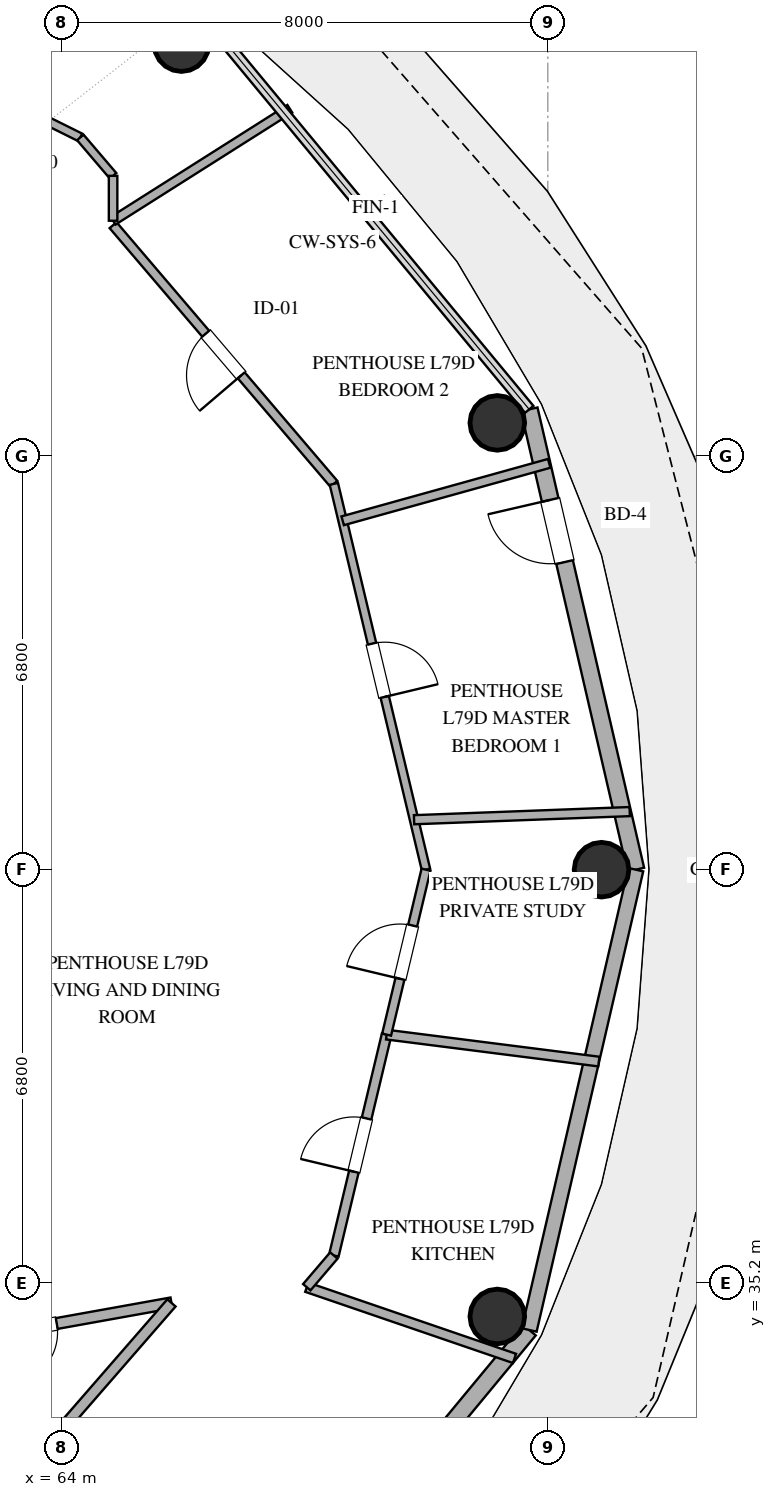
"""IFC4 building model, lengths in metres.
Left out: names, types, materials, properties, quantities, classifications, styles, units other than length and angle.
Written with IfcOpenShell. Run it as: python <this file> out.ifc"""

import sys

from ifc_helpers import new_model, si_unit, direction, frame, frame_2d, origin, origin_2d, place, context, subcontext, project, spatial, rectangle, hollow_circle, extrude, element, fill, save


model = new_model("IFC4")
c1 = context("Model", 3, precision=1e-05, world=origin(), true_north=direction((0.0, 1.0)))
c2 = subcontext(c1, "Body", "Model", "MODEL_VIEW")
j1 = project(units=[si_unit("LENGTHUNIT", "METRE"), si_unit("PLANEANGLEUNIT", "RADIAN")], contexts=[c1])
p1 = place(None, origin())
s1 = spatial("IfcSite", under=j1, at=p1, CompositionType="ELEMENT")
p2 = place(p1, origin())
s2 = spatial("IfcBuilding", under=s1, at=p2, CompositionType="ELEMENT")
p3 = place(p2, frame((0.0, 0.0, 305.4)))
s3 = spatial("IfcBuildingStorey", under=s2, at=p3, CompositionType="ELEMENT", Elevation=305.4)
for number, where, z_axis, x_axis in (
    (1, (72.883, 42.0, 0.0), (0.0, 0.0, 1.0), (1.0, 0.0, 0.0)),
    (2, (71.169, 49.347, 0.0), (0.0, 0.0, 1.0), (1.0, 0.0, 0.0)),
    (3, (65.975, 55.576, 0.0), (0.0, 0.0, 1.0), (1.0, 0.0, 0.0)),
    (4, (71.169, 34.653, 0.0), (0.0, 0.0, 1.0), (1.0, 0.0, 0.0)),
):
    element("IfcColumn", number, at=place(p3, frame(where, z_axis=z_axis, x_axis=x_axis)), inside=s3, PredefinedType="COLUMN", context=c2, shape_type="SweptSolid", body=[
        extrude(hollow_circle(Radius=0.45, WallThickness=0.025, at=origin_2d()), origin(), (0.0, 0.0, 1.0), 3.37),
    ])
p4 = place(p3, frame((73.447, 42.0, 0.0), z_axis=(0.0, 0.0, 1.0), x_axis=(-0.225635078214, 0.974211892495, 0.0)))
e5 = element("IfcWall", 5, at=p4, inside=s3, PredefinedType="SOLIDWALL", context=c2, shape_type="SweptSolid", body=[
    extrude(rectangle(XDim=7.77, YDim=0.28, at=frame_2d((3.885, 0.0))), origin(), (0.0, 0.0, 1.0), 3.37),
])
p5 = place(p4, frame((5.192, 0.0, 0.0)))
e6 = element("IfcOpeningElement", 6, at=p5, cuts=e5, PredefinedType="OPENING", context=c2, shape_type="SweptSolid", body=[
    extrude(rectangle(XDim=1.05, YDim=2.2, at=frame_2d((0.525, 1.1))), frame((0.0, 0.15, 0.0), z_axis=(0.0, -1.0, 0.0), x_axis=(1.0, 0.0, 0.0)), (0.0, 0.0, 1.0), 0.3),
])
p6 = place(p3, frame((66.383, 28.013, 0.0), z_axis=(0.0, 0.0, 1.0), x_axis=(0.63761509934, 0.770355103243, 0.0)))
e7 = element("IfcWall", 7, at=p6, inside=s3, PredefinedType="SOLIDWALL", context=c2, shape_type="SweptSolid", body=[
    extrude(rectangle(XDim=8.33, YDim=0.28, at=frame_2d((4.165, 0.0))), origin(), (0.0, 0.0, 1.0), 3.37),
])
p7 = place(p6, frame((2.426, 0.0, 0.85)))
e8 = element("IfcOpeningElement", 8, at=p7, cuts=e7, PredefinedType="OPENING", context=c2, shape_type="SweptSolid", body=[
    extrude(rectangle(XDim=1.2, YDim=1.8, at=frame_2d((0.6, 0.9))), frame((0.0, 0.15, 0.0), z_axis=(0.0, -1.0, 0.0), x_axis=(1.0, 0.0, 0.0)), (0.0, 0.0, 1.0), 0.3),
])
p8 = place(p6, frame((4.596, 0.0, 0.85)))
e9 = element("IfcOpeningElement", 9, at=p8, cuts=e7, PredefinedType="OPENING", context=c2, shape_type="SweptSolid", body=[
    extrude(rectangle(XDim=1.2, YDim=1.8, at=frame_2d((0.6, 0.9))), frame((0.0, 0.15, 0.0), z_axis=(0.0, -1.0, 0.0), x_axis=(1.0, 0.0, 0.0)), (0.0, 0.0, 1.0), 0.3),
])
p9 = place(p3, frame((71.694, 34.43, 0.0), z_axis=(0.0, 0.0, 1.0), x_axis=(0.225635078214, 0.974211892495, 0.0)))
e10 = element("IfcWall", 10, at=p9, inside=s3, PredefinedType="SOLIDWALL", context=c2, shape_type="SweptSolid", body=[
    extrude(rectangle(XDim=7.77, YDim=0.25, at=frame_2d((3.885, 0.0))), origin(), (0.0, 0.0, 1.0), 3.37),
])
p10 = place(p3, frame((56.704, 35.2, 0.0), z_axis=(0.0, 0.0, 1.0), x_axis=(0.78802314347, -0.615645616695, 0.0)))
e11 = element("IfcWall", 11, at=p10, inside=s3, PredefinedType="PARTITIONING", context=c2, shape_type="SweptSolid", body=[
    extrude(rectangle(XDim=12.034, YDim=0.2, at=frame_2d((6.017, 0.0))), origin(), (0.0, 0.0, 1.0), 2.73),
])
p11 = place(p3, frame((68.481, 48.345, 0.0), z_axis=(0.0, 0.0, 1.0), x_axis=(-0.649208179997, 0.760610767097, 0.0)))
e12 = element("IfcWall", 12, at=p11, inside=s3, PredefinedType="PARTITIONING", context=c2, shape_type="SweptSolid", body=[
    extrude(rectangle(XDim=5.593, YDim=0.15, at=frame_2d((2.796, 0.0))), origin(), (0.0, 0.0, 1.0), 2.73),
])
p12 = place(p11, frame((2.346, 0.0, 0.0)))
e13 = element("IfcOpeningElement", 13, at=p12, cuts=e12, PredefinedType="OPENING", context=c2, shape_type="SweptSolid", body=[
    extrude(rectangle(XDim=0.9, YDim=2.1, at=frame_2d((0.45, 1.05))), frame((0.0, 0.085, 0.0), z_axis=(0.0, -1.0, 0.0), x_axis=(1.0, 0.0, 0.0)), (0.0, 0.0, 1.0), 0.17),
])
p13 = place(p3, frame((68.481, 48.345, 0.0), z_axis=(0.0, 0.0, 1.0), x_axis=(0.232298462197, -0.972644551962, 0.0)))
e14 = element("IfcWall", 14, at=p13, inside=s3, PredefinedType="PARTITIONING", context=c2, shape_type="SweptSolid", body=[
    extrude(rectangle(XDim=6.523, YDim=0.14, at=frame_2d((3.262, 0.0))), origin(), (0.0, 0.0, 1.0), 2.73),
])
p14 = place(p13, frame((2.702, 0.0, 0.0)))
e15 = element("IfcOpeningElement", 15, at=p14, cuts=e14, PredefinedType="OPENING", context=c2, shape_type="SweptSolid", body=[
    extrude(rectangle(XDim=0.9, YDim=2.1, at=frame_2d((0.45, 1.05))), frame((0.0, 0.08, 0.0), z_axis=(0.0, -1.0, 0.0), x_axis=(1.0, 0.0, 0.0)), (0.0, 0.0, 1.0), 0.16),
])
p15 = place(p3, frame((65.81, 34.875, 0.0), z_axis=(0.0, 0.0, 1.0), x_axis=(-0.984255399889, -0.1767521083, 0.0)))
e16 = element("IfcWall", 16, at=p15, inside=s3, PredefinedType="PLUMBINGWALL", context=c2, shape_type="SweptSolid", body=[
    extrude(rectangle(XDim=4.684, YDim=0.18, at=frame_2d((2.342, 0.0))), origin(), (0.0, 0.0, 1.0), 2.73),
])
p16 = place(p15, frame((1.917, 0.0, 0.0)))
e17 = element("IfcOpeningElement", 17, at=p16, cuts=e16, PredefinedType="OPENING", context=c2, shape_type="SweptSolid", body=[
    extrude(rectangle(XDim=0.85, YDim=2.1, at=frame_2d((0.425, 1.05))), frame((0.0, 0.1, 0.0), z_axis=(0.0, -1.0, 0.0), x_axis=(1.0, 0.0, 0.0)), (0.0, 0.0, 1.0), 0.2),
])
p17 = place(p3, frame((68.481, 35.655, 0.0), z_axis=(0.0, 0.0, 1.0), x_axis=(0.232262682455, 0.972653096607, 0.0)))
e18 = element("IfcWall", 18, at=p17, inside=s3, PredefinedType="PLUMBINGWALL", context=c2, shape_type="SweptSolid", body=[
    extrude(rectangle(XDim=3.735, YDim=0.16, at=frame_2d((1.867, 0.0))), origin(), (0.0, 0.0, 1.0), 2.73),
])
p18 = place(p17, frame((1.417, 0.0, 0.0)))
e19 = element("IfcOpeningElement", 19, at=p18, cuts=e18, PredefinedType="OPENING", context=c2, shape_type="SweptSolid", body=[
    extrude(rectangle(XDim=0.9, YDim=2.1, at=frame_2d((0.45, 1.05))), frame((0.0, 0.09, 0.0), z_axis=(0.0, -1.0, 0.0), x_axis=(1.0, 0.0, 0.0)), (0.0, 0.0, 1.0), 0.18),
])
p19 = place(p3, frame((71.452, 33.962, 0.0), z_axis=(0.0, 0.0, 1.0), x_axis=(-0.945979125591, 0.32422753422, 0.0)))
e20 = element("IfcWall", 20, at=p19, inside=s3, PredefinedType="PLUMBINGWALL", context=c2, shape_type="SweptSolid", body=[
    extrude(rectangle(XDim=3.611, YDim=0.16, at=frame_2d((1.806, 0.0))), origin(), (0.0, 0.0, 1.0), 2.73),
])
p20 = place(p3, frame((63.45, 32.163, 0.0), z_axis=(0.0, 0.0, 1.0), x_axis=(0.656415720833, 0.754399364689, 0.0)))
e21 = element("IfcWall", 21, at=p20, inside=s3, PredefinedType="PLUMBINGWALL", context=c2, shape_type="SweptSolid", body=[
    extrude(rectangle(XDim=3.595, YDim=0.18, at=frame_2d((1.798, 0.0))), origin(), (0.0, 0.0, 1.0), 2.73),
])
p21 = place(p3, frame((69.8, 42.822, 0.0), z_axis=(0.0, 0.0, 1.0), x_axis=(0.999291840202, 0.037627358477, 0.0)))
e22 = element("IfcWall", 22, at=p21, inside=s3, PredefinedType="PARTITIONING", context=c2, shape_type="SweptSolid", body=[
    extrude(rectangle(XDim=3.549, YDim=0.15, at=frame_2d((1.774, 0.0))), origin(), (0.0, 0.0, 1.0), 2.73),
])
p22 = place(p3, frame((72.022, 48.682, 0.0), z_axis=(0.0, 0.0, 1.0), x_axis=(-0.963436508671, -0.267936734621, 0.0)))
e23 = element("IfcWall", 23, at=p22, inside=s3, PredefinedType="PARTITIONING", context=c2, shape_type="SweptSolid", body=[
    extrude(rectangle(XDim=3.525, YDim=0.15, at=frame_2d((1.763, 0.0))), origin(), (0.0, 0.0, 1.0), 2.73),
])
p23 = place(p3, frame((72.839, 38.844, 0.0), z_axis=(0.0, 0.0, 1.0), x_axis=(-0.992028222336, 0.126015896178, 0.0)))
e24 = element("IfcWall", 24, at=p23, inside=s3, PredefinedType="PLUMBINGWALL", context=c2, shape_type="SweptSolid", body=[
    extrude(rectangle(XDim=3.518, YDim=0.16, at=frame_2d((1.759, 0.0))), origin(), (0.0, 0.0, 1.0), 2.73),
])
p24 = place(p3, frame((64.85, 52.672, 0.0), z_axis=(0.0, 0.0, 1.0), x_axis=(0.84478165195, 0.535111166515, 0.0)))
e25 = element("IfcWall", 25, at=p24, inside=s3, PredefinedType="PARTITIONING", context=c2, shape_type="SweptSolid", body=[
    extrude(rectangle(XDim=3.44, YDim=0.15, at=frame_2d((1.72, 0.0))), origin(), (0.0, 0.0, 1.0), 2.73),
])
p25 = place(p3, frame((69.348, 39.288, 0.0), z_axis=(0.0, 0.0, 1.0), x_axis=(0.232346378521, 0.972633106772, 0.0)))
e26 = element("IfcWall", 26, at=p25, inside=s3, PredefinedType="PARTITIONING", context=c2, shape_type="SweptSolid", body=[
    extrude(rectangle(XDim=2.789, YDim=0.15, at=frame_2d((1.395, 0.0))), origin(), (0.0, 0.0, 1.0), 2.73),
])
p26 = place(p25, frame((0.944, 0.0, 0.0)))
e27 = element("IfcOpeningElement", 27, at=p26, cuts=e26, PredefinedType="OPENING", context=c2, shape_type="SweptSolid", body=[
    extrude(rectangle(XDim=0.9, YDim=2.1, at=frame_2d((0.45, 1.05))), frame((0.0, 0.085, 0.0), z_axis=(0.0, -1.0, 0.0), x_axis=(1.0, 0.0, 0.0)), (0.0, 0.0, 1.0), 0.17),
])
p27 = place(p3, frame((64.311, 54.042, 0.0), z_axis=(0.0, 0.0, 1.0), x_axis=(-0.895409226325, 0.445244109912, 0.0)))
e28 = element("IfcWall", 28, at=p27, inside=s3, PredefinedType="PARTITIONING", context=c2, shape_type="SweptSolid", body=[
    extrude(rectangle(XDim=1.141, YDim=0.14, at=frame_2d((0.571, 0.0))), origin(), (0.0, 0.0, 1.0), 2.73),
])
p28 = place(p3, frame((64.85, 53.41, 0.0), z_axis=(0.0, 0.0, 1.0), x_axis=(-0.649191857323, 0.760624698774, 0.0)))
e29 = element("IfcWall", 29, at=p28, inside=s3, PredefinedType="PARTITIONING", context=c2, shape_type="SweptSolid", body=[
    extrude(rectangle(XDim=0.83, YDim=0.14, at=frame_2d((0.415, 0.0))), origin(), (0.0, 0.0, 1.0), 2.73),
])
p29 = place(p3, frame((64.85, 52.672, 0.0), z_axis=(0.0, 0.0, 1.0), x_axis=(0.0, 1.0, 0.0)))
e30 = element("IfcWall", 30, at=p29, inside=s3, PredefinedType="PARTITIONING", context=c2, shape_type="SweptSolid", body=[
    extrude(rectangle(XDim=0.739, YDim=0.14, at=frame_2d((0.369, 0.0))), origin(), (0.0, 0.0, 1.0), 2.73),
])
p30 = place(p3, frame((68.036, 35.133, 0.0), z_axis=(0.0, 0.0, 1.0), x_axis=(0.649207140033, 0.760611654743, 0.0)))
e31 = element("IfcWall", 31, at=p30, inside=s3, PredefinedType="PLUMBINGWALL", context=c2, shape_type="SweptSolid", body=[
    extrude(rectangle(XDim=0.686, YDim=0.16, at=frame_2d((0.343, 0.0))), origin(), (0.0, 0.0, 1.0), 2.73),
])
p31 = place(p5, origin())
e32 = element("IfcDoor", 32, at=p31, inside=s3, OperationType="SINGLE_SWING_RIGHT", PredefinedType="DOOR", context=c2, shape_type="SweptSolid", body=[
    extrude(rectangle(XDim=1.05, YDim=2.2, at=frame_2d((0.525, 1.1))), frame((0.0, 0.025, 0.0), z_axis=(0.0, -1.0, 0.0), x_axis=(1.0, 0.0, 0.0)), (0.0, 0.0, 1.0), 0.05),
])
fill(e6, e32)
p32 = place(p12, origin())
e33 = element("IfcDoor", 33, at=p32, inside=s3, OperationType="SINGLE_SWING_LEFT", PredefinedType="DOOR", context=c2, shape_type="SweptSolid", body=[
    extrude(rectangle(XDim=0.9, YDim=2.1, at=frame_2d((0.45, 1.05))), frame((0.0, 0.025, 0.0), z_axis=(0.0, -1.0, 0.0), x_axis=(1.0, 0.0, 0.0)), (0.0, 0.0, 1.0), 0.05),
])
fill(e13, e33)
p33 = place(p14, origin())
e34 = element("IfcDoor", 34, at=p33, inside=s3, OperationType="SINGLE_SWING_RIGHT", PredefinedType="DOOR", context=c2, shape_type="SweptSolid", body=[
    extrude(rectangle(XDim=0.9, YDim=2.1, at=frame_2d((0.45, 1.05))), frame((0.0, 0.025, 0.0), z_axis=(0.0, -1.0, 0.0), x_axis=(1.0, 0.0, 0.0)), (0.0, 0.0, 1.0), 0.05),
])
fill(e15, e34)
p34 = place(p16, origin())
e35 = element("IfcDoor", 35, at=p34, inside=s3, OperationType="SINGLE_SWING_RIGHT", PredefinedType="DOOR", context=c2, shape_type="SweptSolid", body=[
    extrude(rectangle(XDim=0.85, YDim=2.1, at=frame_2d((0.425, 1.05))), frame((0.0, 0.025, 0.0), z_axis=(0.0, -1.0, 0.0), x_axis=(1.0, 0.0, 0.0)), (0.0, 0.0, 1.0), 0.05),
])
fill(e17, e35)
p35 = place(p18, origin())
e36 = element("IfcDoor", 36, at=p35, inside=s3, OperationType="SINGLE_SWING_LEFT", PredefinedType="DOOR", context=c2, shape_type="SweptSolid", body=[
    extrude(rectangle(XDim=0.9, YDim=2.1, at=frame_2d((0.45, 1.05))), frame((0.0, 0.025, 0.0), z_axis=(0.0, -1.0, 0.0), x_axis=(1.0, 0.0, 0.0)), (0.0, 0.0, 1.0), 0.05),
])
fill(e19, e36)
p36 = place(p26, origin())
e37 = element("IfcDoor", 37, at=p36, inside=s3, OperationType="SINGLE_SWING_LEFT", PredefinedType="DOOR", context=c2, shape_type="SweptSolid", body=[
    extrude(rectangle(XDim=0.9, YDim=2.1, at=frame_2d((0.45, 1.05))), frame((0.0, 0.025, 0.0), z_axis=(0.0, -1.0, 0.0), x_axis=(1.0, 0.0, 0.0)), (0.0, 0.0, 1.0), 0.05),
])
fill(e27, e37)
save(model, sys.argv[1])
